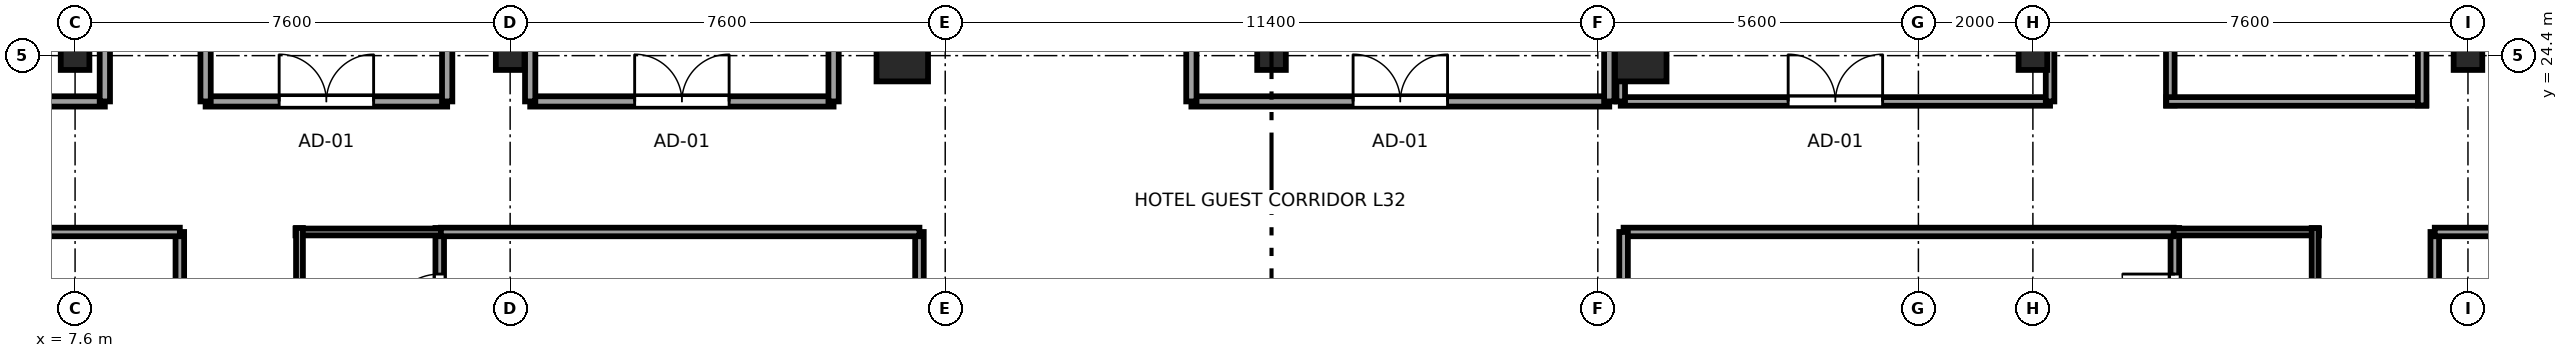
"""IFC4 building model, lengths in metres.
Left out: names, types, materials, properties, quantities, classifications, styles, units other than length and angle.
Written with IfcOpenShell. Run it as: python <this file> out.ifc"""

import sys

from ifc_helpers import new_model, si_unit, direction, frame, frame_2d, origin, origin_2d, place, context, subcontext, project, spatial, rectangle, i_section, extrude, source, transform, mapped, element, fill, save


model = new_model("IFC4")
c1 = context("Model", 3, precision=1e-05, world=origin(), true_north=direction((0.0, 1.0)))
c2 = subcontext(c1, "Body", "Model", "MODEL_VIEW")
j1 = project(units=[si_unit("LENGTHUNIT", "METRE"), si_unit("PLANEANGLEUNIT", "RADIAN")], contexts=[c1])
p1 = place(None, origin())
s1 = spatial("IfcSite", under=j1, at=p1, CompositionType="ELEMENT")
p2 = place(p1, origin())
s2 = spatial("IfcBuilding", under=s1, at=p2, CompositionType="ELEMENT")
p3 = place(p2, frame((0.0, 0.0, 125.75)))
s3 = spatial("IfcBuildingStorey", under=s2, at=p3, CompositionType="ELEMENT", Elevation=125.75)
m1 = source(origin(), c2, "Body", "SweptSolid", [
    extrude(i_section(OverallWidth=0.5, OverallDepth=0.5, WebThickness=0.022, FlangeThickness=0.034, at=origin_2d()), origin(), (0.0, 0.0, 1.0), 3.55),
])
for number, where, z_axis, x_axis in (
    (1, (7.6, 24.4, 0.0), (0.0, 0.0, 1.0), (1.0, 0.0, 0.0)),
    (2, (15.2, 24.4, 0.0), (0.0, 0.0, 1.0), (1.0, 0.0, 0.0)),
):
    element("IfcColumn", number, at=place(p3, frame(where, z_axis=z_axis, x_axis=x_axis)), inside=s3, PredefinedType="COLUMN", context=c2, shape_type="MappedRepresentation", body=[
        mapped(m1, transform((0.0, 0.0, 0.0), x_axis=(1.0, 0.0, 0.0), y_axis=(0.0, 1.0, 0.0), z_axis=(0.0, 0.0, 1.0), scale=1.0)),
    ])
m2 = source(origin(), c2, "Body", "SweptSolid", [
    extrude(rectangle(XDim=0.9, YDim=0.9, at=origin_2d()), origin(), (0.0, 0.0, 1.0), 3.55),
])
for number, where, z_axis, x_axis in (
    (3, (22.05, 24.4, 0.0), (0.0, 0.0, 1.0), (1.0, 0.0, 0.0)),
    (4, (34.95, 24.4, 0.0), (0.0, 0.0, 1.0), (1.0, 0.0, 0.0)),
):
    element("IfcColumn", number, at=place(p3, frame(where, z_axis=z_axis, x_axis=x_axis)), inside=s3, PredefinedType="COLUMN", context=c2, shape_type="MappedRepresentation", body=[
        mapped(m2, transform((0.0, 0.0, 0.0), x_axis=(1.0, 0.0, 0.0), y_axis=(0.0, 1.0, 0.0), z_axis=(0.0, 0.0, 1.0), scale=1.0)),
    ])
for number, where, z_axis, x_axis in (
    (5, (41.8, 24.4, 0.0), (0.0, 0.0, 1.0), (1.0, 0.0, 0.0)),
    (6, (49.4, 24.4, 0.0), (0.0, 0.0, 1.0), (1.0, 0.0, 0.0)),
    (7, (28.5, 24.4, 0.0), (0.0, 0.0, 1.0), (1.0, 0.0, 0.0)),
):
    element("IfcColumn", number, at=place(p3, frame(where, z_axis=z_axis, x_axis=x_axis)), inside=s3, PredefinedType="COLUMN", context=c2, shape_type="MappedRepresentation", body=[
        mapped(m1, transform((0.0, 0.0, 0.0), x_axis=(1.0, 0.0, 0.0), y_axis=(0.0, 1.0, 0.0), z_axis=(0.0, 0.0, 1.0), scale=1.0)),
    ])
p4 = place(p3, frame((13.97, 19.0, 0.0), z_axis=(0.0, 0.0, 1.0), x_axis=(0.0, 1.0, 0.0)))
e8 = element("IfcWall", 8, at=p4, inside=s3, PredefinedType="PARTITIONING", context=c2, shape_type="SweptSolid", body=[
    extrude(rectangle(XDim=2.39, YDim=0.15, at=frame_2d((1.195, 0.0))), origin(), (0.0, 0.0, 1.0), 3.37),
])
p5 = place(p4, frame((0.665, 0.0, 0.0)))
e9 = element("IfcOpeningElement", 9, at=p5, cuts=e8, PredefinedType="OPENING", context=c2, shape_type="SweptSolid", body=[
    extrude(rectangle(XDim=0.92, YDim=2.01, at=frame_2d((0.46, 1.005))), frame((0.0, 0.085, 0.0), z_axis=(0.0, -1.0, 0.0), x_axis=(1.0, 0.0, 0.0)), (0.0, 0.0, 1.0), 0.17),
])
p6 = place(p3, frame((11.45, 21.32, 0.0), z_axis=(0.0, 0.0, 1.0), x_axis=(1.0, 0.0, 0.0)))
e10 = element("IfcWall", 10, at=p6, inside=s3, PredefinedType="PLUMBINGWALL", context=c2, shape_type="SweptSolid", body=[
    extrude(rectangle(XDim=2.59, YDim=0.12, at=frame_2d((1.295, 0.0))), origin(), (0.0, 0.0, 1.0), 3.37),
])
p7 = place(p3, frame((11.52, 19.0, 0.0), z_axis=(0.0, 0.0, 1.0), x_axis=(0.0, 1.0, 0.0)))
e11 = element("IfcWall", 11, at=p7, inside=s3, PredefinedType="PLUMBINGWALL", context=c2, shape_type="SweptSolid", body=[
    extrude(rectangle(XDim=2.39, YDim=0.12, at=frame_2d((1.195, 0.0))), origin(), (0.0, 0.0, 1.0), 2.954),
])
p8 = place(p3, frame((44.28, 19.0, 0.0), z_axis=(0.0, 0.0, 1.0), x_axis=(0.0, 1.0, 0.0)))
e12 = element("IfcWall", 12, at=p8, inside=s3, PredefinedType="PARTITIONING", context=c2, shape_type="SweptSolid", body=[
    extrude(rectangle(XDim=2.39, YDim=0.15, at=frame_2d((1.195, 0.0))), origin(), (0.0, 0.0, 1.0), 3.37),
])
p9 = place(p8, frame((0.665, 0.0, 0.0)))
e13 = element("IfcOpeningElement", 13, at=p9, cuts=e12, PredefinedType="OPENING", context=c2, shape_type="SweptSolid", body=[
    extrude(rectangle(XDim=0.92, YDim=2.01, at=frame_2d((0.46, 1.005))), frame((0.0, 0.085, 0.0), z_axis=(0.0, -1.0, 0.0), x_axis=(1.0, 0.0, 0.0)), (0.0, 0.0, 1.0), 0.17),
])
p10 = place(p3, frame((44.21, 21.32, 0.0), z_axis=(0.0, 0.0, 1.0), x_axis=(1.0, 0.0, 0.0)))
e14 = element("IfcWall", 14, at=p10, inside=s3, PredefinedType="PLUMBINGWALL", context=c2, shape_type="SweptSolid", body=[
    extrude(rectangle(XDim=2.59, YDim=0.12, at=frame_2d((1.295, 0.0))), origin(), (0.0, 0.0, 1.0), 3.37),
])
p11 = place(p3, frame((46.73, 19.0, 0.0), z_axis=(0.0, 0.0, 1.0), x_axis=(0.0, 1.0, 0.0)))
e15 = element("IfcWall", 15, at=p11, inside=s3, PredefinedType="PLUMBINGWALL", context=c2, shape_type="SweptSolid", body=[
    extrude(rectangle(XDim=2.39, YDim=0.12, at=frame_2d((1.195, 0.0))), origin(), (0.0, 0.0, 1.0), 3.37),
])
p12 = place(p3, frame((9.43, 13.21, 0.0), z_axis=(0.0, 0.0, 1.0), x_axis=(0.0, 1.0, 0.0)))
e16 = element("IfcWall", 16, at=p12, inside=s3, PredefinedType="PARTITIONING", context=c2, shape_type="SweptSolid", body=[
    extrude(rectangle(XDim=8.11, YDim=0.15, at=frame_2d((4.055, 0.0))), origin(), (0.0, 0.0, 1.0), 3.37),
])
p13 = place(p12, frame((3.545, 0.0, 0.0)))
e17 = element("IfcOpeningElement", 17, at=p13, cuts=e16, PredefinedType="OPENING", context=c2, shape_type="SweptSolid", body=[
    extrude(rectangle(XDim=0.98, YDim=2.12, at=frame_2d((0.49, 1.06))), frame((0.0, 0.085, 0.0), z_axis=(0.0, -1.0, 0.0), x_axis=(1.0, 0.0, 0.0)), (0.0, 0.0, 1.0), 0.17),
])
p14 = place(p3, frame((0.405, 21.32, 0.0), z_axis=(0.0, 0.0, 1.0), x_axis=(1.0, 0.0, 0.0)))
e18 = element("IfcWall", 18, at=p14, inside=s3, PredefinedType="PARTITIONING", context=c2, shape_type="SweptSolid", body=[
    extrude(rectangle(XDim=9.025, YDim=0.15, at=frame_2d((4.512, 0.0))), origin(), (0.0, 0.0, 1.0), 3.37),
])
p15 = place(p3, frame((22.35, 8.28, 0.0), z_axis=(0.0, 0.0, 1.0), x_axis=(0.0, 1.0, 0.0)))
e19 = element("IfcWall", 19, at=p15, inside=s3, PredefinedType="PARTITIONING", context=c2, shape_type="SweptSolid", body=[
    extrude(rectangle(XDim=13.04, YDim=0.15, at=frame_2d((6.52, 0.0))), origin(), (0.0, 0.0, 1.0), 3.37),
])
p16 = place(p3, frame((13.99, 21.32, 0.0), z_axis=(0.0, 0.0, 1.0), x_axis=(1.0, 0.0, 0.0)))
e20 = element("IfcWall", 20, at=p16, inside=s3, PredefinedType="PARTITIONING", context=c2, shape_type="SweptSolid", body=[
    extrude(rectangle(XDim=8.36, YDim=0.15, at=frame_2d((4.18, 0.0))), origin(), (0.0, 0.0, 1.0), 3.37),
])
p17 = place(p3, frame((34.65, 21.32, 0.0), z_axis=(0.0, 0.0, 1.0), x_axis=(1.0, 0.0, 0.0)))
e21 = element("IfcWall", 21, at=p17, inside=s3, PredefinedType="PARTITIONING", context=c2, shape_type="SweptSolid", body=[
    extrude(rectangle(XDim=9.61, YDim=0.15, at=frame_2d((4.805, 0.0))), origin(), (0.0, 0.0, 1.0), 3.37),
])
p18 = place(p3, frame((34.65, 8.23, 0.0), z_axis=(0.0, 0.0, 1.0), x_axis=(0.0, 1.0, 0.0)))
e22 = element("IfcWall", 22, at=p18, inside=s3, PredefinedType="PARTITIONING", context=c2, shape_type="SweptSolid", body=[
    extrude(rectangle(XDim=13.09, YDim=0.15, at=frame_2d((6.545, 0.0))), origin(), (0.0, 0.0, 1.0), 3.37),
])
p19 = place(p3, frame((48.82, 13.21, 0.0), z_axis=(0.0, 0.0, 1.0), x_axis=(0.0, 1.0, 0.0)))
e23 = element("IfcWall", 23, at=p19, inside=s3, PredefinedType="PARTITIONING", context=c2, shape_type="SweptSolid", body=[
    extrude(rectangle(XDim=8.11, YDim=0.15, at=frame_2d((4.055, 0.0))), origin(), (0.0, 0.0, 1.0), 3.37),
])
p20 = place(p19, frame((4.145, 0.0, 0.0)))
e24 = element("IfcOpeningElement", 24, at=p20, cuts=e23, PredefinedType="OPENING", context=c2, shape_type="SweptSolid", body=[
    extrude(rectangle(XDim=0.98, YDim=2.12, at=frame_2d((0.49, 1.06))), frame((0.0, 0.085, 0.0), z_axis=(0.0, -1.0, 0.0), x_axis=(1.0, 0.0, 0.0)), (0.0, 0.0, 1.0), 0.17),
])
p21 = place(p3, frame((48.82, 21.32, 0.0), z_axis=(0.0, 0.0, 1.0), x_axis=(1.0, 0.0, 0.0)))
e25 = element("IfcWall", 25, at=p21, inside=s3, PredefinedType="PARTITIONING", context=c2, shape_type="SweptSolid", body=[
    extrude(rectangle(XDim=7.88, YDim=0.15, at=frame_2d((3.94, 0.0))), origin(), (0.0, 0.0, 1.0), 3.37),
])
p22 = place(p3, frame((0.405, 23.6, 0.0), z_axis=(0.0, 0.0, 1.0), x_axis=(1.0, 0.0, 0.0)))
e26 = element("IfcWall", 26, at=p22, inside=s3, PredefinedType="PARTITIONING", context=c2, shape_type="SweptSolid", body=[
    extrude(rectangle(XDim=7.715, YDim=0.18, at=frame_2d((3.857, 0.0))), origin(), (0.0, 0.0, 1.0), 3.37),
])
p23 = place(p3, frame((8.12, 23.6, 0.0), z_axis=(0.0, 0.0, 1.0), x_axis=(0.0, 1.0, 0.0)))
e27 = element("IfcWall", 27, at=p23, inside=s3, PredefinedType="PARTITIONING", context=c2, shape_type="SweptSolid", body=[
    extrude(rectangle(XDim=7.6, YDim=0.18, at=frame_2d((3.8, 0.0))), origin(), (0.0, 0.0, 1.0), 3.37),
])
p24 = place(p23, frame((2.975, 0.0, 0.0)))
e28 = element("IfcOpeningElement", 28, at=p24, cuts=e27, PredefinedType="OPENING", context=c2, shape_type="SweptSolid", body=[
    extrude(rectangle(XDim=1.65, YDim=2.15, at=frame_2d((0.825, 1.075))), frame((0.0, 0.1, 0.0), z_axis=(0.0, -1.0, 0.0), x_axis=(1.0, 0.0, 0.0)), (0.0, 0.0, 1.0), 0.2),
])
p25 = place(p3, frame((44.2, 23.53, 0.0), z_axis=(0.0, 0.0, 1.0), x_axis=(0.0, 1.0, 0.0)))
e29 = element("IfcWall", 29, at=p25, inside=s3, PredefinedType="PARTITIONING", context=c2, shape_type="SweptSolid", body=[
    extrude(rectangle(XDim=3.74, YDim=0.15, at=frame_2d((1.87, 0.0))), origin(), (0.0, 0.0, 1.0), 3.37),
])
p26 = place(p25, frame((1.24, 0.0, 0.0)))
e30 = element("IfcOpeningElement", 30, at=p26, cuts=e29, PredefinedType="OPENING", context=c2, shape_type="SweptSolid", body=[
    extrude(rectangle(XDim=0.92, YDim=2.01, at=frame_2d((0.46, 1.005))), frame((0.0, 0.085, 0.0), z_axis=(0.0, -1.0, 0.0), x_axis=(1.0, 0.0, 0.0)), (0.0, 0.0, 1.0), 0.17),
])
p27 = place(p3, frame((44.13, 23.6, 0.0), z_axis=(0.0, 0.0, 1.0), x_axis=(1.0, 0.0, 0.0)))
e31 = element("IfcWall", 31, at=p27, inside=s3, PredefinedType="PARTITIONING", context=c2, shape_type="SweptSolid", body=[
    extrude(rectangle(XDim=4.54, YDim=0.15, at=frame_2d((2.27, 0.0))), origin(), (0.0, 0.0, 1.0), 3.37),
])
p28 = place(p3, frame((48.6, 23.53, 0.0), z_axis=(0.0, 0.0, 1.0), x_axis=(0.0, 1.0, 0.0)))
e32 = element("IfcWall", 32, at=p28, inside=s3, PredefinedType="PARTITIONING", context=c2, shape_type="SweptSolid", body=[
    extrude(rectangle(XDim=3.74, YDim=0.15, at=frame_2d((1.87, 0.0))), origin(), (0.0, 0.0, 1.0), 3.37),
])
p29 = place(p3, frame((9.88, 23.6, 0.0), z_axis=(0.0, 0.0, 1.0), x_axis=(1.0, 0.0, 0.0)))
e33 = element("IfcWall", 33, at=p29, inside=s3, PredefinedType="PARTITIONING", context=c2, shape_type="SweptSolid", body=[
    extrude(rectangle(XDim=4.22, YDim=0.18, at=frame_2d((2.11, 0.0))), origin(), (0.0, 0.0, 1.0), 3.37),
])
p30 = place(p29, frame((1.285, 0.0, 0.0)))
e34 = element("IfcOpeningElement", 34, at=p30, cuts=e33, PredefinedType="OPENING", context=c2, shape_type="SweptSolid", body=[
    extrude(rectangle(XDim=1.65, YDim=2.15, at=frame_2d((0.825, 1.075))), frame((0.0, 0.1, 0.0), z_axis=(0.0, -1.0, 0.0), x_axis=(1.0, 0.0, 0.0)), (0.0, 0.0, 1.0), 0.2),
])
for number, where, z_axis, x_axis in (
    (35, (9.88, 23.6, 0.0), (0.0, 0.0, 1.0), (0.0, 1.0, 0.0)),
    (36, (14.1, 23.6, 0.0), (0.0, 0.0, 1.0), (0.0, 1.0, 0.0)),
):
    element("IfcWall", number, at=place(p3, frame(where, z_axis=z_axis, x_axis=x_axis)), inside=s3, PredefinedType="PARTITIONING", context=c2, shape_type="SweptSolid", body=[
        extrude(rectangle(XDim=6.15, YDim=0.18, at=frame_2d((3.075, 0.0))), origin(), (0.0, 0.0, 1.0), 3.37),
    ])
p31 = place(p3, frame((27.1, 23.6, 0.0), z_axis=(0.0, 0.0, 1.0), x_axis=(1.0, 0.0, 0.0)))
e37 = element("IfcWall", 37, at=p31, inside=s3, PredefinedType="PARTITIONING", context=c2, shape_type="SweptSolid", body=[
    extrude(rectangle(XDim=7.3, YDim=0.18, at=frame_2d((3.65, 0.0))), origin(), (0.0, 0.0, 1.0), 3.37),
])
p32 = place(p31, frame((2.825, 0.0, 0.0)))
e38 = element("IfcOpeningElement", 38, at=p32, cuts=e37, PredefinedType="OPENING", context=c2, shape_type="SweptSolid", body=[
    extrude(rectangle(XDim=1.65, YDim=2.15, at=frame_2d((0.825, 1.075))), frame((0.0, 0.1, 0.0), z_axis=(0.0, -1.0, 0.0), x_axis=(1.0, 0.0, 0.0)), (0.0, 0.0, 1.0), 0.2),
])
for number, where, z_axis, x_axis in (
    (39, (27.1, 23.6, 0.0), (0.0, 0.0, 1.0), (0.0, 1.0, 0.0)),
    (40, (34.4, 23.6, 0.0), (0.0, 0.0, 1.0), (0.0, 1.0, 0.0)),
):
    element("IfcWall", number, at=place(p3, frame(where, z_axis=z_axis, x_axis=x_axis)), inside=s3, PredefinedType="PARTITIONING", context=c2, shape_type="SweptSolid", body=[
        extrude(rectangle(XDim=6.2, YDim=0.18, at=frame_2d((3.1, 0.0))), origin(), (0.0, 0.0, 1.0), 3.37),
    ])
p33 = place(p3, frame((15.55, 23.6, 0.0), z_axis=(0.0, 0.0, 1.0), x_axis=(1.0, 0.0, 0.0)))
e41 = element("IfcWall", 41, at=p33, inside=s3, PredefinedType="PARTITIONING", context=c2, shape_type="SweptSolid", body=[
    extrude(rectangle(XDim=5.3, YDim=0.18, at=frame_2d((2.65, 0.0))), origin(), (0.0, 0.0, 1.0), 3.37),
])
p34 = place(p33, frame((1.825, 0.0, 0.0)))
e42 = element("IfcOpeningElement", 42, at=p34, cuts=e41, PredefinedType="OPENING", context=c2, shape_type="SweptSolid", body=[
    extrude(rectangle(XDim=1.65, YDim=2.15, at=frame_2d((0.825, 1.075))), frame((0.0, 0.1, 0.0), z_axis=(0.0, -1.0, 0.0), x_axis=(1.0, 0.0, 0.0)), (0.0, 0.0, 1.0), 0.2),
])
for number, where, z_axis, x_axis in (
    (43, (15.55, 23.6, 0.0), (0.0, 0.0, 1.0), (0.0, 1.0, 0.0)),
    (44, (20.85, 23.6, 0.0), (0.0, 0.0, 1.0), (0.0, 1.0, 0.0)),
):
    element("IfcWall", number, at=place(p3, frame(where, z_axis=z_axis, x_axis=x_axis)), inside=s3, PredefinedType="PARTITIONING", context=c2, shape_type="SweptSolid", body=[
        extrude(rectangle(XDim=6.2, YDim=0.18, at=frame_2d((3.1, 0.0))), origin(), (0.0, 0.0, 1.0), 3.37),
    ])
p35 = place(p3, frame((34.6, 23.6, 0.0), z_axis=(0.0, 0.0, 1.0), x_axis=(1.0, 0.0, 0.0)))
e45 = element("IfcWall", 45, at=p35, inside=s3, PredefinedType="PARTITIONING", context=c2, shape_type="SweptSolid", body=[
    extrude(rectangle(XDim=7.5, YDim=0.15, at=frame_2d((3.75, 0.0))), origin(), (0.0, 0.0, 1.0), 3.37),
])
p36 = place(p35, frame((2.925, 0.0, 0.0)))
e46 = element("IfcOpeningElement", 46, at=p36, cuts=e45, PredefinedType="OPENING", context=c2, shape_type="SweptSolid", body=[
    extrude(rectangle(XDim=1.65, YDim=2.15, at=frame_2d((0.825, 1.075))), frame((0.0, 0.085, 0.0), z_axis=(0.0, -1.0, 0.0), x_axis=(1.0, 0.0, 0.0)), (0.0, 0.0, 1.0), 0.17),
])
p37 = place(p3, frame((34.6, 23.6, 0.0), z_axis=(0.0, 0.0, 1.0), x_axis=(0.0, 1.0, 0.0)))
e47 = element("IfcWall", 47, at=p37, inside=s3, PredefinedType="PARTITIONING", context=c2, shape_type="SweptSolid", body=[
    extrude(rectangle(XDim=5.8, YDim=0.15, at=frame_2d((2.9, 0.0))), origin(), (0.0, 0.0, 1.0), 3.37),
])
p38 = place(p3, frame((42.1, 23.6, 0.0), z_axis=(0.0, 0.0, 1.0), x_axis=(0.0, 1.0, 0.0)))
e48 = element("IfcWall", 48, at=p38, inside=s3, PredefinedType="PARTITIONING", context=c2, shape_type="SweptSolid", body=[
    extrude(rectangle(XDim=5.8, YDim=0.15, at=frame_2d((2.9, 0.0))), origin(), (0.0, 0.0, 1.0), 2.16),
])
m3 = source(origin(), c2, "Body", "SweptSolid", [
    extrude(rectangle(XDim=0.92, YDim=2.01, at=frame_2d((0.46, 1.005))), frame((0.0, 0.025, 0.0), z_axis=(0.0, -1.0, 0.0), x_axis=(1.0, 0.0, 0.0)), (0.0, 0.0, 1.0), 0.05),
])
p39 = place(p5, origin())
e49 = element("IfcDoor", 49, at=p39, inside=s3, OperationType="SINGLE_SWING_LEFT", PredefinedType="DOOR", context=c2, shape_type="MappedRepresentation", body=[
    mapped(m3, transform((0.0, 0.0, 0.0), x_axis=(1.0, 0.0, 0.0), y_axis=(0.0, 1.0, 0.0), z_axis=(0.0, 0.0, 1.0), scale=1.0)),
])
fill(e9, e49)
p40 = place(p9, origin())
e50 = element("IfcDoor", 50, at=p40, inside=s3, OperationType="SINGLE_SWING_RIGHT", PredefinedType="DOOR", context=c2, shape_type="MappedRepresentation", body=[
    mapped(m3, transform((0.0, 0.0, 0.0), x_axis=(1.0, 0.0, 0.0), y_axis=(0.0, 1.0, 0.0), z_axis=(0.0, 0.0, 1.0), scale=1.0)),
])
fill(e13, e50)
m4 = source(origin(), c2, "Body", "SweptSolid", [
    extrude(rectangle(XDim=1.65, YDim=2.15, at=frame_2d((0.825, 1.075))), frame((0.0, 0.025, 0.0), z_axis=(0.0, -1.0, 0.0), x_axis=(1.0, 0.0, 0.0)), (0.0, 0.0, 1.0), 0.05),
])
p41 = place(p30, origin())
e51 = element("IfcDoor", 51, at=p41, inside=s3, OperationType="DOUBLE_DOOR_SINGLE_SWING", PredefinedType="DOOR", context=c2, shape_type="MappedRepresentation", body=[
    mapped(m4, transform((0.0, 0.0, 0.0), x_axis=(1.0, 0.0, 0.0), y_axis=(0.0, 1.0, 0.0), z_axis=(0.0, 0.0, 1.0), scale=1.0)),
])
fill(e34, e51)
p42 = place(p32, origin())
e52 = element("IfcDoor", 52, at=p42, inside=s3, OperationType="DOUBLE_DOOR_SINGLE_SWING", PredefinedType="DOOR", context=c2, shape_type="MappedRepresentation", body=[
    mapped(m4, transform((0.0, 0.0, 0.0), x_axis=(1.0, 0.0, 0.0), y_axis=(0.0, 1.0, 0.0), z_axis=(0.0, 0.0, 1.0), scale=1.0)),
])
fill(e38, e52)
p43 = place(p34, origin())
e53 = element("IfcDoor", 53, at=p43, inside=s3, OperationType="DOUBLE_DOOR_SINGLE_SWING", PredefinedType="DOOR", context=c2, shape_type="MappedRepresentation", body=[
    mapped(m4, transform((0.0, 0.0, 0.0), x_axis=(1.0, 0.0, 0.0), y_axis=(0.0, 1.0, 0.0), z_axis=(0.0, 0.0, 1.0), scale=1.0)),
])
fill(e42, e53)
p44 = place(p36, origin())
e54 = element("IfcDoor", 54, at=p44, inside=s3, OperationType="DOUBLE_DOOR_SINGLE_SWING", PredefinedType="DOOR", context=c2, shape_type="MappedRepresentation", body=[
    mapped(m4, transform((0.0, 0.0, 0.0), x_axis=(1.0, 0.0, 0.0), y_axis=(0.0, 1.0, 0.0), z_axis=(0.0, 0.0, 1.0), scale=1.0)),
])
fill(e46, e54)
save(model, sys.argv[1])
